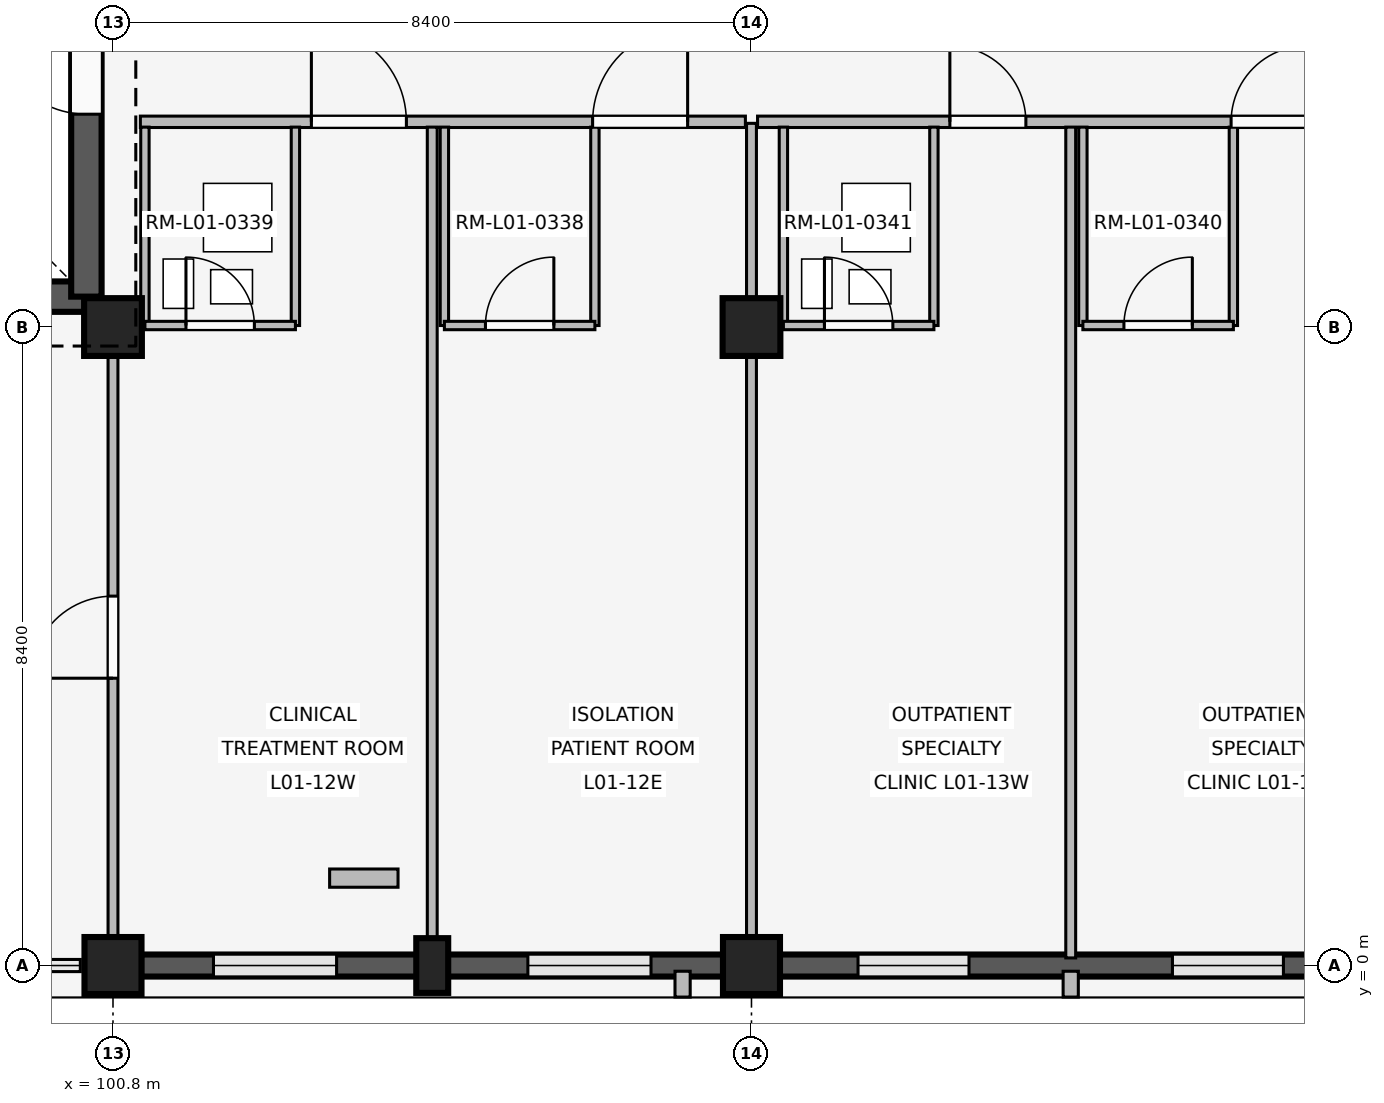
"""IFC4 building model, lengths in metres.
Left out: names, types, materials, properties, quantities, classifications, styles, units other than length and angle.
Written with IfcOpenShell. Run it as: python <this file> out.ifc"""

import sys

from ifc_helpers import new_model, si_unit, direction, frame, frame_2d, origin, origin_2d, place, context, subcontext, project, spatial, rectangle, extrude, element, fill, save


model = new_model("IFC4")
c1 = context("Model", 3, precision=1e-05, world=origin(), true_north=direction((0.0, 1.0)))
c2 = subcontext(c1, "Body", "Model", "MODEL_VIEW")
j1 = project(units=[si_unit("LENGTHUNIT", "METRE"), si_unit("PLANEANGLEUNIT", "RADIAN")], contexts=[c1])
p1 = place(None, origin())
s1 = spatial("IfcSite", under=j1, at=p1, CompositionType="ELEMENT")
p2 = place(p1, origin())
s2 = spatial("IfcBuilding", under=s1, at=p2, CompositionType="ELEMENT")
p3 = place(p2, frame((0.0, 0.0, 4.8)))
s3 = spatial("IfcBuildingStorey", under=s2, at=p3, CompositionType="ELEMENT", Elevation=4.8)
p4 = place(p3, frame((100.8, 0.0, 0.0), z_axis=(0.0, 0.0, 1.0), x_axis=(1.0, 0.0, 0.0)))
e1 = element("IfcColumn", 1, at=p4, inside=s3, PredefinedType="COLUMN", context=c2, shape_type="SweptSolid", body=[
    extrude(rectangle(XDim=0.75, YDim=0.75, at=origin_2d()), origin(), (0.0, 0.0, 1.0), 3.3),
])
p5 = place(p3, frame((100.8, 8.4, 0.0), z_axis=(0.0, 0.0, 1.0), x_axis=(1.0, 0.0, 0.0)))
e2 = element("IfcColumn", 2, at=p5, inside=s3, PredefinedType="COLUMN", context=c2, shape_type="SweptSolid", body=[
    extrude(rectangle(XDim=0.76, YDim=0.76, at=origin_2d()), origin(), (0.0, 0.0, 1.0), 3.3),
])
p6 = place(p3, frame((109.2, 0.0, 0.0), z_axis=(0.0, 0.0, 1.0), x_axis=(1.0, 0.0, 0.0)))
e3 = element("IfcColumn", 3, at=p6, inside=s3, PredefinedType="COLUMN", context=c2, shape_type="SweptSolid", body=[
    extrude(rectangle(XDim=0.75, YDim=0.75, at=origin_2d()), origin(), (0.0, 0.0, 1.0), 3.3),
])
p7 = place(p3, frame((109.2, 8.4, 0.0), z_axis=(0.0, 0.0, 1.0), x_axis=(1.0, 0.0, 0.0)))
e4 = element("IfcColumn", 4, at=p7, inside=s3, PredefinedType="COLUMN", context=c2, shape_type="SweptSolid", body=[
    extrude(rectangle(XDim=0.76, YDim=0.76, at=origin_2d()), origin(), (0.0, 0.0, 1.0), 3.3),
])
p8 = place(p3, frame((105.0, 0.0, 0.0), z_axis=(0.0, 0.0, 1.0), x_axis=(1.0, 0.0, 0.0)))
e5 = element("IfcColumn", 5, at=p8, inside=s3, PredefinedType="PILASTER", context=c2, shape_type="SweptSolid", body=[
    extrude(rectangle(XDim=0.42, YDim=0.72, at=origin_2d()), origin(), (0.0, 0.0, 1.0), 3.3),
])
p9 = place(p3, frame((108.83, 0.0, 0.0), z_axis=(0.0, 0.0, 1.0), x_axis=(-1.0, 0.0, 0.0)))
e6 = element("IfcWall", 6, at=p9, inside=s3, PredefinedType="SOLIDWALL", context=c2, shape_type="SweptSolid", body=[
    extrude(rectangle(XDim=7.66, YDim=0.29, at=frame_2d((3.83, 0.0))), origin(), (0.0, 0.0, 1.0), 2.42),
])
p10 = place(p9, frame((0.952, 0.0, 0.85)))
e7 = element("IfcOpeningElement", 7, at=p10, cuts=e6, PredefinedType="OPENING", context=c2, shape_type="SweptSolid", body=[
    extrude(rectangle(XDim=1.62, YDim=0.95, at=frame_2d((0.81, 0.475))), frame((0.0, 0.155, 0.0), z_axis=(0.0, -1.0, 0.0), x_axis=(1.0, 0.0, 0.0)), (0.0, 0.0, 1.0), 0.31),
])
p11 = place(p9, frame((5.088, 0.0, 0.85)))
e8 = element("IfcOpeningElement", 8, at=p11, cuts=e6, PredefinedType="OPENING", context=c2, shape_type="SweptSolid", body=[
    extrude(rectangle(XDim=1.62, YDim=0.95, at=frame_2d((0.81, 0.475))), frame((0.0, 0.155, 0.0), z_axis=(0.0, -1.0, 0.0), x_axis=(1.0, 0.0, 0.0)), (0.0, 0.0, 1.0), 0.31),
])
p12 = place(p3, frame((108.294, -0.075, 0.0), z_axis=(0.0, 0.0, 1.0), x_axis=(0.0, -1.0, 0.0)))
e9 = element("IfcWall", 9, at=p12, inside=s3, PredefinedType="ELEMENTEDWALL", context=c2, shape_type="SweptSolid", body=[
    extrude(rectangle(XDim=0.34, YDim=0.2, at=frame_2d((0.17, 0.0))), origin(), (0.0, 0.0, 1.0), 2.4),
])
p13 = place(p3, frame((117.23, 0.0, 0.0), z_axis=(0.0, 0.0, 1.0), x_axis=(-1.0, 0.0, 0.0)))
e10 = element("IfcWall", 10, at=p13, inside=s3, PredefinedType="SOLIDWALL", context=c2, shape_type="SweptSolid", body=[
    extrude(rectangle(XDim=7.66, YDim=0.29, at=frame_2d((3.83, 0.0))), origin(), (0.0, 0.0, 1.0), 2.42),
])
p14 = place(p13, frame((1.032, 0.0, 0.85)))
e11 = element("IfcOpeningElement", 11, at=p14, cuts=e10, PredefinedType="OPENING", context=c2, shape_type="SweptSolid", body=[
    extrude(rectangle(XDim=1.46, YDim=0.85, at=frame_2d((0.73, 0.425))), frame((0.0, 0.155, 0.0), z_axis=(0.0, -1.0, 0.0), x_axis=(1.0, 0.0, 0.0)), (0.0, 0.0, 1.0), 0.31),
])
p15 = place(p13, frame((5.168, 0.0, 0.85)))
e12 = element("IfcOpeningElement", 12, at=p15, cuts=e10, PredefinedType="OPENING", context=c2, shape_type="SweptSolid", body=[
    extrude(rectangle(XDim=1.46, YDim=0.85, at=frame_2d((0.73, 0.425))), frame((0.0, 0.155, 0.0), z_axis=(0.0, -1.0, 0.0), x_axis=(1.0, 0.0, 0.0)), (0.0, 0.0, 1.0), 0.31),
])
p16 = place(p3, frame((113.4, -0.075, 0.0), z_axis=(0.0, 0.0, 1.0), x_axis=(0.0, -1.0, 0.0)))
e13 = element("IfcWall", 13, at=p16, inside=s3, PredefinedType="ELEMENTEDWALL", context=c2, shape_type="SweptSolid", body=[
    extrude(rectangle(XDim=0.34, YDim=0.2, at=frame_2d((0.17, 0.0))), origin(), (0.0, 0.0, 1.0), 2.4),
])
p17 = place(p3, frame((92.95, 8.8, 0.0), z_axis=(0.0, 0.0, 1.0), x_axis=(1.0, 0.0, 0.0)))
e14 = element("IfcWall", 14, at=p17, inside=s3, PredefinedType="SHEAR", context=c2, shape_type="SweptSolid", body=[
    extrude(rectangle(XDim=7.5, YDim=0.4, at=frame_2d((3.75, 0.0))), origin(), (0.0, 0.0, 1.0), 3.02),
])
p18 = place(p17, frame((4.85, 0.0, 0.0)))
e15 = element("IfcOpeningElement", 15, at=p18, cuts=e14, PredefinedType="OPENING", context=c2, shape_type="SweptSolid", body=[
    extrude(rectangle(XDim=1.2, YDim=2.1, at=frame_2d((0.6, 1.05))), frame((0.0, 0.21, 0.0), z_axis=(0.0, -1.0, 0.0), x_axis=(1.0, 0.0, 0.0)), (0.0, 0.0, 1.0), 0.42),
])
p19 = place(p3, frame((100.45, 8.8, 0.0), z_axis=(0.0, 0.0, 1.0), x_axis=(0.0, 1.0, 0.0)))
e16 = element("IfcWall", 16, at=p19, inside=s3, PredefinedType="SHEAR", context=c2, shape_type="SweptSolid", body=[
    extrude(rectangle(XDim=7.55, YDim=0.4, at=frame_2d((3.775, 0.0))), origin(), (0.0, 0.0, 1.0), 3.02),
])
p20 = place(p19, frame((2.4, 0.0, 0.0)))
e17 = element("IfcOpeningElement", 17, at=p20, cuts=e16, PredefinedType="OPENING", context=c2, shape_type="SweptSolid", body=[
    extrude(rectangle(XDim=1.2, YDim=2.2, at=frame_2d((0.6, 1.1))), frame((0.0, 0.21, 0.0), z_axis=(0.0, -1.0, 0.0), x_axis=(1.0, 0.0, 0.0)), (0.0, 0.0, 1.0), 0.42),
])
p21 = place(p3, frame((100.8, 0.14, 0.0), z_axis=(0.0, 0.0, 1.0), x_axis=(0.0, 1.0, 0.0)))
e18 = element("IfcWall", 18, at=p21, inside=s3, PredefinedType="PARTITIONING", context=c2, shape_type="SweptSolid", body=[
    extrude(rectangle(XDim=8.21, YDim=0.13, at=frame_2d((4.105, 0.0))), origin(), (0.0, 0.0, 1.0), 2.4),
])
p22 = place(p21, frame((3.64, 0.0, 0.0)))
e19 = element("IfcOpeningElement", 19, at=p22, cuts=e18, PredefinedType="OPENING", context=c2, shape_type="SweptSolid", body=[
    extrude(rectangle(XDim=1.08, YDim=2.15, at=frame_2d((0.54, 1.075))), frame((0.0, 0.075, 0.0), z_axis=(0.0, -1.0, 0.0), x_axis=(1.0, 0.0, 0.0)), (0.0, 0.0, 1.0), 0.15),
])
p23 = place(p3, frame((101.16, 11.1, 0.0), z_axis=(0.0, 0.0, 1.0), x_axis=(1.0, 0.0, 0.0)))
e20 = element("IfcWall", 20, at=p23, inside=s3, PredefinedType="PARTITIONING", context=c2, shape_type="SweptSolid", body=[
    extrude(rectangle(XDim=7.96, YDim=0.15, at=frame_2d((3.98, 0.0))), origin(), (0.0, 0.0, 1.0), 2.4),
])
p24 = place(p23, frame((2.25, 0.0, 0.0)))
e21 = element("IfcOpeningElement", 21, at=p24, cuts=e20, PredefinedType="OPENING", context=c2, shape_type="SweptSolid", body=[
    extrude(rectangle(XDim=1.25, YDim=2.2, at=frame_2d((0.625, 1.1))), frame((0.0, 0.085, 0.0), z_axis=(0.0, -1.0, 0.0), x_axis=(1.0, 0.0, 0.0)), (0.0, 0.0, 1.0), 0.17),
])
p25 = place(p23, frame((5.95, 0.0, 0.0)))
e22 = element("IfcOpeningElement", 22, at=p25, cuts=e20, PredefinedType="OPENING", context=c2, shape_type="SweptSolid", body=[
    extrude(rectangle(XDim=1.25, YDim=2.2, at=frame_2d((0.625, 1.1))), frame((0.0, 0.085, 0.0), z_axis=(0.0, -1.0, 0.0), x_axis=(1.0, 0.0, 0.0)), (0.0, 0.0, 1.0), 0.17),
])
p26 = place(p3, frame((105.0, 0.1, 0.0), z_axis=(0.0, 0.0, 1.0), x_axis=(0.0, 1.0, 0.0)))
e23 = element("IfcWall", 23, at=p26, inside=s3, PredefinedType="PARTITIONING", context=c2, shape_type="SweptSolid", body=[
    extrude(rectangle(XDim=10.93, YDim=0.13, at=frame_2d((5.465, 0.0))), origin(), (0.0, 0.0, 1.0), 2.4),
])
for number, where, z_axis, x_axis in (
    (24, (101.22, 8.42, 0.0), (0.0, 0.0, 1.0), (0.0, 1.0, 0.0)),
    (25, (103.2, 8.42, 0.0), (0.0, 0.0, 1.0), (0.0, 1.0, 0.0)),
):
    element("IfcWall", number, at=place(p3, frame(where, z_axis=z_axis, x_axis=x_axis)), inside=s3, PredefinedType="PARTITIONING", context=c2, shape_type="SweptSolid", body=[
        extrude(rectangle(XDim=2.61, YDim=0.11, at=frame_2d((1.305, 0.0))), origin(), (0.0, 0.0, 1.0), 2.4),
    ])
p27 = place(p3, frame((101.22, 8.42, 0.0), z_axis=(0.0, 0.0, 1.0), x_axis=(1.0, 0.0, 0.0)))
e26 = element("IfcWall", 26, at=p27, inside=s3, PredefinedType="PARTITIONING", context=c2, shape_type="SweptSolid", body=[
    extrude(rectangle(XDim=1.98, YDim=0.11, at=frame_2d((0.99, 0.0))), origin(), (0.0, 0.0, 1.0), 2.4),
])
p28 = place(p27, frame((0.54, 0.0, 0.0)))
e27 = element("IfcOpeningElement", 27, at=p28, cuts=e26, PredefinedType="OPENING", context=c2, shape_type="SweptSolid", body=[
    extrude(rectangle(XDim=0.9, YDim=2.1, at=frame_2d((0.45, 1.05))), frame((0.0, 0.065, 0.0), z_axis=(0.0, -1.0, 0.0), x_axis=(1.0, 0.0, 0.0)), (0.0, 0.0, 1.0), 0.13),
])
for number, where, z_axis, x_axis in (
    (28, (105.16, 8.42, 0.0), (0.0, 0.0, 1.0), (0.0, 1.0, 0.0)),
    (29, (107.14, 8.42, 0.0), (0.0, 0.0, 1.0), (0.0, 1.0, 0.0)),
):
    element("IfcWall", number, at=place(p3, frame(where, z_axis=z_axis, x_axis=x_axis)), inside=s3, PredefinedType="PARTITIONING", context=c2, shape_type="SweptSolid", body=[
        extrude(rectangle(XDim=2.61, YDim=0.11, at=frame_2d((1.305, 0.0))), origin(), (0.0, 0.0, 1.0), 2.4),
    ])
p29 = place(p3, frame((105.16, 8.42, 0.0), z_axis=(0.0, 0.0, 1.0), x_axis=(1.0, 0.0, 0.0)))
e30 = element("IfcWall", 30, at=p29, inside=s3, PredefinedType="PARTITIONING", context=c2, shape_type="SweptSolid", body=[
    extrude(rectangle(XDim=1.98, YDim=0.11, at=frame_2d((0.99, 0.0))), origin(), (0.0, 0.0, 1.0), 2.4),
])
p30 = place(p29, frame((0.54, 0.0, 0.0)))
e31 = element("IfcOpeningElement", 31, at=p30, cuts=e30, PredefinedType="OPENING", context=c2, shape_type="SweptSolid", body=[
    extrude(rectangle(XDim=0.9, YDim=2.1, at=frame_2d((0.45, 1.05))), frame((0.0, 0.065, 0.0), z_axis=(0.0, -1.0, 0.0), x_axis=(1.0, 0.0, 0.0)), (0.0, 0.0, 1.0), 0.13),
])
p31 = place(p3, frame((103.65, 1.15, 0.0), z_axis=(0.0, 0.0, 1.0), x_axis=(1.0, 0.0, 0.0)))
e32 = element("IfcWall", 32, at=p31, inside=s3, PredefinedType="PLUMBINGWALL", context=c2, shape_type="SweptSolid", body=[
    extrude(rectangle(XDim=0.9, YDim=0.24, at=frame_2d((0.45, 0.0))), origin(), (0.0, 0.0, 1.0), 2.4),
])
p32 = place(p3, frame((109.2, 0.14, 0.0), z_axis=(0.0, 0.0, 1.0), x_axis=(0.0, 1.0, 0.0)))
e33 = element("IfcWall", 33, at=p32, inside=s3, PredefinedType="PARTITIONING", context=c2, shape_type="SweptSolid", body=[
    extrude(rectangle(XDim=10.94, YDim=0.13, at=frame_2d((5.47, 0.0))), origin(), (0.0, 0.0, 1.0), 2.4),
])
p33 = place(p3, frame((109.28, 11.1, 0.0), z_axis=(0.0, 0.0, 1.0), x_axis=(1.0, 0.0, 0.0)))
e34 = element("IfcWall", 34, at=p33, inside=s3, PredefinedType="PARTITIONING", context=c2, shape_type="SweptSolid", body=[
    extrude(rectangle(XDim=8.24, YDim=0.15, at=frame_2d((4.12, 0.0))), origin(), (0.0, 0.0, 1.0), 2.4),
])
p34 = place(p33, frame((2.53, 0.0, 0.0)))
e35 = element("IfcOpeningElement", 35, at=p34, cuts=e34, PredefinedType="OPENING", context=c2, shape_type="SweptSolid", body=[
    extrude(rectangle(XDim=1.0, YDim=2.15, at=frame_2d((0.5, 1.075))), frame((0.0, 0.085, 0.0), z_axis=(0.0, -1.0, 0.0), x_axis=(1.0, 0.0, 0.0)), (0.0, 0.0, 1.0), 0.17),
])
p35 = place(p33, frame((6.23, 0.0, 0.0)))
e36 = element("IfcOpeningElement", 36, at=p35, cuts=e34, PredefinedType="OPENING", context=c2, shape_type="SweptSolid", body=[
    extrude(rectangle(XDim=1.0, YDim=2.15, at=frame_2d((0.5, 1.075))), frame((0.0, 0.085, 0.0), z_axis=(0.0, -1.0, 0.0), x_axis=(1.0, 0.0, 0.0)), (0.0, 0.0, 1.0), 0.17),
])
p36 = place(p3, frame((113.4, 0.1, 0.0), z_axis=(0.0, 0.0, 1.0), x_axis=(0.0, 1.0, 0.0)))
e37 = element("IfcWall", 37, at=p36, inside=s3, PredefinedType="PARTITIONING", context=c2, shape_type="SweptSolid", body=[
    extrude(rectangle(XDim=10.93, YDim=0.13, at=frame_2d((5.465, 0.0))), origin(), (0.0, 0.0, 1.0), 2.4),
])
for number, where, z_axis, x_axis in (
    (38, (109.62, 8.42, 0.0), (0.0, 0.0, 1.0), (0.0, 1.0, 0.0)),
    (39, (111.6, 8.42, 0.0), (0.0, 0.0, 1.0), (0.0, 1.0, 0.0)),
):
    element("IfcWall", number, at=place(p3, frame(where, z_axis=z_axis, x_axis=x_axis)), inside=s3, PredefinedType="PARTITIONING", context=c2, shape_type="SweptSolid", body=[
        extrude(rectangle(XDim=2.61, YDim=0.11, at=frame_2d((1.305, 0.0))), origin(), (0.0, 0.0, 1.0), 2.4),
    ])
p37 = place(p3, frame((109.62, 8.42, 0.0), z_axis=(0.0, 0.0, 1.0), x_axis=(1.0, 0.0, 0.0)))
e40 = element("IfcWall", 40, at=p37, inside=s3, PredefinedType="PARTITIONING", context=c2, shape_type="SweptSolid", body=[
    extrude(rectangle(XDim=1.98, YDim=0.11, at=frame_2d((0.99, 0.0))), origin(), (0.0, 0.0, 1.0), 2.4),
])
p38 = place(p37, frame((0.54, 0.0, 0.0)))
e41 = element("IfcOpeningElement", 41, at=p38, cuts=e40, PredefinedType="OPENING", context=c2, shape_type="SweptSolid", body=[
    extrude(rectangle(XDim=0.9, YDim=2.1, at=frame_2d((0.45, 1.05))), frame((0.0, 0.065, 0.0), z_axis=(0.0, -1.0, 0.0), x_axis=(1.0, 0.0, 0.0)), (0.0, 0.0, 1.0), 0.13),
])
for number, where, z_axis, x_axis in (
    (42, (113.56, 8.42, 0.0), (0.0, 0.0, 1.0), (0.0, 1.0, 0.0)),
    (43, (115.54, 8.42, 0.0), (0.0, 0.0, 1.0), (0.0, 1.0, 0.0)),
):
    element("IfcWall", number, at=place(p3, frame(where, z_axis=z_axis, x_axis=x_axis)), inside=s3, PredefinedType="PARTITIONING", context=c2, shape_type="SweptSolid", body=[
        extrude(rectangle(XDim=2.61, YDim=0.11, at=frame_2d((1.305, 0.0))), origin(), (0.0, 0.0, 1.0), 2.4),
    ])
p39 = place(p3, frame((113.56, 8.42, 0.0), z_axis=(0.0, 0.0, 1.0), x_axis=(1.0, 0.0, 0.0)))
e44 = element("IfcWall", 44, at=p39, inside=s3, PredefinedType="PARTITIONING", context=c2, shape_type="SweptSolid", body=[
    extrude(rectangle(XDim=1.98, YDim=0.11, at=frame_2d((0.99, 0.0))), origin(), (0.0, 0.0, 1.0), 2.4),
])
p40 = place(p39, frame((0.54, 0.0, 0.0)))
e45 = element("IfcOpeningElement", 45, at=p40, cuts=e44, PredefinedType="OPENING", context=c2, shape_type="SweptSolid", body=[
    extrude(rectangle(XDim=0.9, YDim=2.1, at=frame_2d((0.45, 1.05))), frame((0.0, 0.065, 0.0), z_axis=(0.0, -1.0, 0.0), x_axis=(1.0, 0.0, 0.0)), (0.0, 0.0, 1.0), 0.13),
])
p41 = place(p10, origin())
e46 = element("IfcWindow", 46, at=p41, inside=s3, PartitioningType="SINGLE_PANEL", PredefinedType="WINDOW", context=c2, shape_type="SweptSolid", body=[
    extrude(rectangle(XDim=1.62, YDim=0.95, at=frame_2d((0.81, 0.475))), frame((0.0, 0.03, 0.0), z_axis=(0.0, -1.0, 0.0), x_axis=(1.0, 0.0, 0.0)), (0.0, 0.0, 1.0), 0.06),
])
fill(e7, e46)
p42 = place(p11, origin())
e47 = element("IfcWindow", 47, at=p42, inside=s3, PartitioningType="SINGLE_PANEL", PredefinedType="WINDOW", context=c2, shape_type="SweptSolid", body=[
    extrude(rectangle(XDim=1.62, YDim=0.95, at=frame_2d((0.81, 0.475))), frame((0.0, 0.03, 0.0), z_axis=(0.0, -1.0, 0.0), x_axis=(1.0, 0.0, 0.0)), (0.0, 0.0, 1.0), 0.06),
])
fill(e8, e47)
p43 = place(p14, origin())
e48 = element("IfcWindow", 48, at=p43, inside=s3, PartitioningType="SINGLE_PANEL", PredefinedType="WINDOW", context=c2, shape_type="SweptSolid", body=[
    extrude(rectangle(XDim=1.46, YDim=0.85, at=frame_2d((0.73, 0.425))), frame((0.0, 0.03, 0.0), z_axis=(0.0, -1.0, 0.0), x_axis=(1.0, 0.0, 0.0)), (0.0, 0.0, 1.0), 0.06),
])
fill(e11, e48)
p44 = place(p15, origin())
e49 = element("IfcWindow", 49, at=p44, inside=s3, PartitioningType="SINGLE_PANEL", PredefinedType="WINDOW", context=c2, shape_type="SweptSolid", body=[
    extrude(rectangle(XDim=1.46, YDim=0.85, at=frame_2d((0.73, 0.425))), frame((0.0, 0.03, 0.0), z_axis=(0.0, -1.0, 0.0), x_axis=(1.0, 0.0, 0.0)), (0.0, 0.0, 1.0), 0.06),
])
fill(e12, e49)
p45 = place(p20, origin())
e50 = element("IfcDoor", 50, at=p45, inside=s3, OperationType="SINGLE_SWING_RIGHT", PredefinedType="DOOR", context=c2, shape_type="SweptSolid", body=[
    extrude(rectangle(XDim=1.2, YDim=2.2, at=frame_2d((0.6, 1.1))), frame((0.0, 0.025, 0.0), z_axis=(0.0, -1.0, 0.0), x_axis=(1.0, 0.0, 0.0)), (0.0, 0.0, 1.0), 0.05),
])
fill(e17, e50)
p46 = place(p22, origin())
e51 = element("IfcDoor", 51, at=p46, inside=s3, OperationType="SINGLE_SWING_LEFT", PredefinedType="DOOR", context=c2, shape_type="SweptSolid", body=[
    extrude(rectangle(XDim=1.08, YDim=2.15, at=frame_2d((0.54, 1.075))), frame((0.0, 0.025, 0.0), z_axis=(0.0, -1.0, 0.0), x_axis=(1.0, 0.0, 0.0)), (0.0, 0.0, 1.0), 0.05),
])
fill(e19, e51)
p47 = place(p24, origin())
e52 = element("IfcDoor", 52, at=p47, inside=s3, OperationType="SINGLE_SWING_LEFT", PredefinedType="DOOR", context=c2, shape_type="SweptSolid", body=[
    extrude(rectangle(XDim=1.25, YDim=2.2, at=frame_2d((0.625, 1.1))), frame((0.0, 0.025, 0.0), z_axis=(0.0, -1.0, 0.0), x_axis=(1.0, 0.0, 0.0)), (0.0, 0.0, 1.0), 0.05),
])
fill(e21, e52)
p48 = place(p25, origin())
e53 = element("IfcDoor", 53, at=p48, inside=s3, OperationType="SINGLE_SWING_RIGHT", PredefinedType="DOOR", context=c2, shape_type="SweptSolid", body=[
    extrude(rectangle(XDim=1.25, YDim=2.2, at=frame_2d((0.625, 1.1))), frame((0.0, 0.025, 0.0), z_axis=(0.0, -1.0, 0.0), x_axis=(1.0, 0.0, 0.0)), (0.0, 0.0, 1.0), 0.05),
])
fill(e22, e53)
p49 = place(p28, origin())
e54 = element("IfcDoor", 54, at=p49, inside=s3, OperationType="SINGLE_SWING_LEFT", PredefinedType="DOOR", context=c2, shape_type="SweptSolid", body=[
    extrude(rectangle(XDim=0.9, YDim=2.1, at=frame_2d((0.45, 1.05))), frame((0.0, 0.025, 0.0), z_axis=(0.0, -1.0, 0.0), x_axis=(1.0, 0.0, 0.0)), (0.0, 0.0, 1.0), 0.05),
])
fill(e27, e54)
p50 = place(p30, origin())
e55 = element("IfcDoor", 55, at=p50, inside=s3, OperationType="SINGLE_SWING_RIGHT", PredefinedType="DOOR", context=c2, shape_type="SweptSolid", body=[
    extrude(rectangle(XDim=0.9, YDim=2.1, at=frame_2d((0.45, 1.05))), frame((0.0, 0.025, 0.0), z_axis=(0.0, -1.0, 0.0), x_axis=(1.0, 0.0, 0.0)), (0.0, 0.0, 1.0), 0.05),
])
fill(e31, e55)
p51 = place(p34, origin())
e56 = element("IfcDoor", 56, at=p51, inside=s3, OperationType="SINGLE_SWING_LEFT", PredefinedType="DOOR", context=c2, shape_type="SweptSolid", body=[
    extrude(rectangle(XDim=1.0, YDim=2.15, at=frame_2d((0.5, 1.075))), frame((0.0, 0.025, 0.0), z_axis=(0.0, -1.0, 0.0), x_axis=(1.0, 0.0, 0.0)), (0.0, 0.0, 1.0), 0.05),
])
fill(e35, e56)
p52 = place(p35, origin())
e57 = element("IfcDoor", 57, at=p52, inside=s3, OperationType="SINGLE_SWING_RIGHT", PredefinedType="DOOR", context=c2, shape_type="SweptSolid", body=[
    extrude(rectangle(XDim=1.0, YDim=2.15, at=frame_2d((0.5, 1.075))), frame((0.0, 0.025, 0.0), z_axis=(0.0, -1.0, 0.0), x_axis=(1.0, 0.0, 0.0)), (0.0, 0.0, 1.0), 0.05),
])
fill(e36, e57)
p53 = place(p38, origin())
e58 = element("IfcDoor", 58, at=p53, inside=s3, OperationType="SINGLE_SWING_LEFT", PredefinedType="DOOR", context=c2, shape_type="SweptSolid", body=[
    extrude(rectangle(XDim=0.9, YDim=2.1, at=frame_2d((0.45, 1.05))), frame((0.0, 0.025, 0.0), z_axis=(0.0, -1.0, 0.0), x_axis=(1.0, 0.0, 0.0)), (0.0, 0.0, 1.0), 0.05),
])
fill(e41, e58)
p54 = place(p40, origin())
e59 = element("IfcDoor", 59, at=p54, inside=s3, OperationType="SINGLE_SWING_RIGHT", PredefinedType="DOOR", context=c2, shape_type="SweptSolid", body=[
    extrude(rectangle(XDim=0.9, YDim=2.1, at=frame_2d((0.45, 1.05))), frame((0.0, 0.025, 0.0), z_axis=(0.0, -1.0, 0.0), x_axis=(1.0, 0.0, 0.0)), (0.0, 0.0, 1.0), 0.05),
])
fill(e45, e59)
save(model, sys.argv[1])
